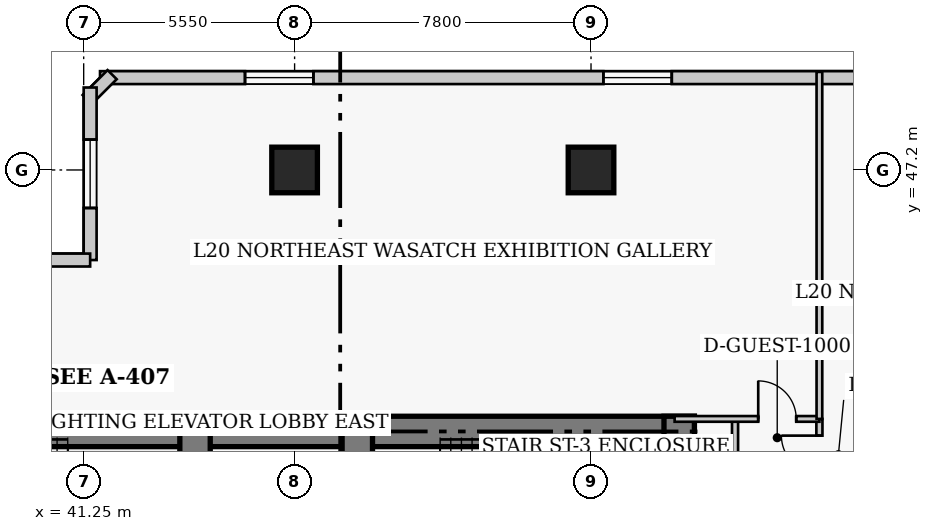
"""IFC4 building model, lengths in metres.
Left out: names, types, materials, properties, quantities, classifications, styles, units other than length and angle.
Written with IfcOpenShell. Run it as: python <this file> out.ifc"""

import sys

from ifc_helpers import new_model, si_unit, direction, frame, frame_2d, origin, origin_2d, place, context, subcontext, project, spatial, rectangle, extrude, element, fill, save


model = new_model("IFC4")
c1 = context("Model", 3, precision=1e-05, world=origin(), true_north=direction((0.0, 1.0)))
c2 = subcontext(c1, "Body", "Model", "MODEL_VIEW")
j1 = project(units=[si_unit("LENGTHUNIT", "METRE"), si_unit("PLANEANGLEUNIT", "RADIAN")], contexts=[c1])
p1 = place(None, origin())
s1 = spatial("IfcSite", under=j1, at=p1, CompositionType="ELEMENT")
p2 = place(p1, origin())
s2 = spatial("IfcBuilding", under=s1, at=p2, CompositionType="ELEMENT")
p3 = place(p2, frame((0.0, 0.0, 84.2)))
s3 = spatial("IfcBuildingStorey", under=s2, at=p3, CompositionType="ELEMENT", Elevation=84.2)
p4 = place(p3, frame((35.85, 40.32, 0.0), z_axis=(0.0, 0.0, 1.0), x_axis=(1.0, 0.0, 0.0)))
e1 = element("IfcWall", 1, at=p4, inside=s3, PredefinedType="SHEAR", context=c2, shape_type="SweptSolid", body=[
    extrude(rectangle(XDim=12.6, YDim=0.8, at=frame_2d((6.3, 0.0))), origin(), (0.0, 0.0, 1.0), 3.8),
])
p5 = place(p3, frame((48.45, 40.32, 0.0), z_axis=(0.0, 0.0, 1.0), x_axis=(1.0, 0.0, 0.0)))
e2 = element("IfcWall", 2, at=p5, inside=s3, PredefinedType="SHEAR", context=c2, shape_type="SweptSolid", body=[
    extrude(rectangle(XDim=8.87, YDim=0.8, at=frame_2d((4.435, 0.0))), origin(), (0.0, 0.0, 1.0), 3.8),
])
p6 = place(p3, frame((56.92, 27.05, 0.0), z_axis=(0.0, 0.0, 1.0), x_axis=(0.0, 1.0, 0.0)))
e3 = element("IfcWall", 3, at=p6, inside=s3, PredefinedType="SHEAR", context=c2, shape_type="SweptSolid", body=[
    extrude(rectangle(XDim=13.67, YDim=0.8, at=frame_2d((6.835, 0.0))), origin(), (0.0, 0.0, 1.0), 3.8),
])
p7 = place(p3, frame((44.18, 36.37, 0.0), z_axis=(0.0, 0.0, 1.0), x_axis=(0.0, 1.0, 0.0)))
e4 = element("IfcWall", 4, at=p7, inside=s3, PredefinedType="SHEAR", context=c2, shape_type="SweptSolid", body=[
    extrude(rectangle(XDim=3.95, YDim=0.8, at=frame_2d((1.975, 0.0))), origin(), (0.0, 0.0, 1.0), 3.8),
])
p8 = place(p3, frame((48.45, 32.35, 0.0), z_axis=(0.0, 0.0, 1.0), x_axis=(0.0, 1.0, 0.0)))
e5 = element("IfcWall", 5, at=p8, inside=s3, PredefinedType="SHEAR", context=c2, shape_type="SweptSolid", body=[
    extrude(rectangle(XDim=7.97, YDim=0.8, at=frame_2d((3.985, 0.0))), origin(), (0.0, 0.0, 1.0), 3.8),
])
p9 = place(p8, frame((5.85, 0.0, 0.0)))
e6 = element("IfcOpeningElement", 6, at=p9, cuts=e5, PredefinedType="OPENING", context=c2, shape_type="SweptSolid", body=[
    extrude(rectangle(XDim=1.1, YDim=2.15, at=frame_2d((0.55, 1.075))), frame((0.0, 0.41, 0.0), z_axis=(0.0, -1.0, 0.0), x_axis=(1.0, 0.0, 0.0)), (0.0, 0.0, 1.0), 0.82),
])
for number, where, z_axis, x_axis in (
    (7, (46.8, 47.2, 0.0), (0.0, 0.0, 1.0), (1.0, 0.0, 0.0)),
    (8, (54.6, 47.2, 0.0), (0.0, 0.0, 1.0), (1.0, 0.0, 0.0)),
):
    element("IfcColumn", number, at=place(p3, frame(where, z_axis=z_axis, x_axis=x_axis)), inside=s3, PredefinedType="COLUMN", context=c2, shape_type="SweptSolid", body=[
        extrude(rectangle(XDim=1.2, YDim=1.2, at=origin_2d()), origin(), (0.0, 0.0, 1.0), 3.8),
    ])
p10 = place(p3, frame((69.97, 49.63, 0.0), z_axis=(0.0, 0.0, 1.0), x_axis=(-1.0, 0.0, 0.0)))
e9 = element("IfcWall", 9, at=p10, inside=s3, PredefinedType="SOLIDWALL", context=c2, shape_type="SweptSolid", body=[
    extrude(rectangle(XDim=28.29, YDim=0.34, at=frame_2d((14.145, 0.0))), origin(), (0.0, 0.0, 1.0), 3.54),
])
p11 = place(p10, frame((3.815, 0.0, 0.85)))
e10 = element("IfcOpeningElement", 10, at=p11, cuts=e9, PredefinedType="OPENING", context=c2, shape_type="SweptSolid", body=[
    extrude(rectangle(XDim=1.8, YDim=1.8, at=frame_2d((0.9, 0.9))), frame((0.0, 0.18, 0.0), z_axis=(0.0, -1.0, 0.0), x_axis=(1.0, 0.0, 0.0)), (0.0, 0.0, 1.0), 0.36),
])
p12 = place(p10, frame((13.245, 0.0, 0.85)))
e11 = element("IfcOpeningElement", 11, at=p12, cuts=e9, PredefinedType="OPENING", context=c2, shape_type="SweptSolid", body=[
    extrude(rectangle(XDim=1.8, YDim=1.8, at=frame_2d((0.9, 0.9))), frame((0.0, 0.18, 0.0), z_axis=(0.0, -1.0, 0.0), x_axis=(1.0, 0.0, 0.0)), (0.0, 0.0, 1.0), 0.36),
])
p13 = place(p10, frame((22.675, 0.0, 0.85)))
e12 = element("IfcOpeningElement", 12, at=p13, cuts=e9, PredefinedType="OPENING", context=c2, shape_type="SweptSolid", body=[
    extrude(rectangle(XDim=1.8, YDim=1.8, at=frame_2d((0.9, 0.9))), frame((0.0, 0.18, 0.0), z_axis=(0.0, -1.0, 0.0), x_axis=(1.0, 0.0, 0.0)), (0.0, 0.0, 1.0), 0.36),
])
p14 = place(p3, frame((41.999, 49.708, 0.0), z_axis=(0.0, 0.0, 1.0), x_axis=(-0.707238225886, -0.706975312048, 0.0)))
e13 = element("IfcWall", 13, at=p14, inside=s3, PredefinedType="SOLIDWALL", context=c2, shape_type="SweptSolid", body=[
    extrude(rectangle(XDim=0.929, YDim=0.34, at=frame_2d((0.464, 0.0))), origin(), (0.0, 0.0, 1.0), 3.54),
])
p15 = place(p3, frame((41.42, 49.37, 0.0), z_axis=(0.0, 0.0, 1.0), x_axis=(0.0, -1.0, 0.0)))
e14 = element("IfcWall", 14, at=p15, inside=s3, PredefinedType="SOLIDWALL", context=c2, shape_type="SweptSolid", body=[
    extrude(rectangle(XDim=4.54, YDim=0.34, at=frame_2d((2.27, 0.0))), origin(), (0.0, 0.0, 1.0), 3.54),
])
p16 = place(p15, frame((1.37, 0.0, 0.85)))
e15 = element("IfcOpeningElement", 15, at=p16, cuts=e14, PredefinedType="OPENING", context=c2, shape_type="SweptSolid", body=[
    extrude(rectangle(XDim=1.8, YDim=1.8, at=frame_2d((0.9, 0.9))), frame((0.0, 0.18, 0.0), z_axis=(0.0, -1.0, 0.0), x_axis=(1.0, 0.0, 0.0)), (0.0, 0.0, 1.0), 0.36),
])
p17 = place(p3, frame((41.42, 44.83, 0.0), z_axis=(0.0, 0.0, 1.0), x_axis=(-1.0, 0.0, 0.0)))
e16 = element("IfcWall", 16, at=p17, inside=s3, PredefinedType="SOLIDWALL", context=c2, shape_type="SweptSolid", body=[
    extrude(rectangle(XDim=4.84, YDim=0.34, at=frame_2d((2.42, 0.0))), origin(), (0.0, 0.0, 1.0), 3.54),
])
p18 = place(p17, frame((1.52, 0.0, 0.85)))
e17 = element("IfcOpeningElement", 17, at=p18, cuts=e16, PredefinedType="OPENING", context=c2, shape_type="SweptSolid", body=[
    extrude(rectangle(XDim=1.8, YDim=1.8, at=frame_2d((0.9, 0.9))), frame((0.0, 0.18, 0.0), z_axis=(0.0, -1.0, 0.0), x_axis=(1.0, 0.0, 0.0)), (0.0, 0.0, 1.0), 0.36),
])
p19 = place(p3, frame((60.61, 11.85, 0.0), z_axis=(0.0, 0.0, 1.0), x_axis=(0.0, 1.0, 0.0)))
e18 = element("IfcWall", 18, at=p19, inside=s3, PredefinedType="PARTITIONING", context=c2, shape_type="SweptSolid", body=[
    extrude(rectangle(XDim=28.8, YDim=0.16, at=frame_2d((14.4, 0.0))), origin(), (0.0, 0.0, 1.0), 3.54),
])
p20 = place(p19, frame((3.6, 0.0, 0.0)))
e19 = element("IfcOpeningElement", 19, at=p20, cuts=e18, PredefinedType="OPENING", context=c2, shape_type="SweptSolid", body=[
    extrude(rectangle(XDim=0.95, YDim=2.1, at=frame_2d((0.475, 1.05))), frame((0.0, 0.09, 0.0), z_axis=(0.0, -1.0, 0.0), x_axis=(1.0, 0.0, 0.0)), (0.0, 0.0, 1.0), 0.18),
])
p21 = place(p19, frame((12.075, 0.0, 0.0)))
e20 = element("IfcOpeningElement", 20, at=p21, cuts=e18, PredefinedType="OPENING", context=c2, shape_type="SweptSolid", body=[
    extrude(rectangle(XDim=0.95, YDim=2.1, at=frame_2d((0.475, 1.05))), frame((0.0, 0.09, 0.0), z_axis=(0.0, -1.0, 0.0), x_axis=(1.0, 0.0, 0.0)), (0.0, 0.0, 1.0), 0.18),
])
p22 = place(p19, frame((20.525, 0.0, 0.0)))
e21 = element("IfcOpeningElement", 21, at=p22, cuts=e18, PredefinedType="OPENING", context=c2, shape_type="SweptSolid", body=[
    extrude(rectangle(XDim=0.95, YDim=2.1, at=frame_2d((0.475, 1.05))), frame((0.0, 0.09, 0.0), z_axis=(0.0, -1.0, 0.0), x_axis=(1.0, 0.0, 0.0)), (0.0, 0.0, 1.0), 0.18),
])
p23 = place(p19, frame((27.36, 0.0, 0.0)))
e22 = element("IfcOpeningElement", 22, at=p23, cuts=e18, PredefinedType="OPENING", context=c2, shape_type="SweptSolid", body=[
    extrude(rectangle(XDim=1.0, YDim=2.15, at=frame_2d((0.5, 1.075))), frame((0.0, 0.09, 0.0), z_axis=(0.0, -1.0, 0.0), x_axis=(1.0, 0.0, 0.0)), (0.0, 0.0, 1.0), 0.18),
])
p24 = place(p3, frame((58.39, 24.91, 0.0), z_axis=(0.0, 0.0, 1.0), x_axis=(0.0, 1.0, 0.0)))
e23 = element("IfcWall", 23, at=p24, inside=s3, PredefinedType="PARTITIONING", context=c2, shape_type="SweptSolid", body=[
    extrude(rectangle(XDim=15.74, YDim=0.16, at=frame_2d((7.87, 0.0))), origin(), (0.0, 0.0, 1.0), 3.54),
])
p25 = place(p3, frame((56.8, 40.65, 0.0), z_axis=(0.0, 0.0, 1.0), x_axis=(1.0, 0.0, 0.0)))
e24 = element("IfcWall", 24, at=p25, inside=s3, PredefinedType="PARTITIONING", context=c2, shape_type="SweptSolid", body=[
    extrude(rectangle(XDim=3.81, YDim=0.15, at=frame_2d((1.905, 0.0))), origin(), (0.0, 0.0, 1.0), 3.54),
])
p26 = place(p25, frame((2.2, 0.0, 0.0)))
e25 = element("IfcOpeningElement", 25, at=p26, cuts=e24, PredefinedType="OPENING", context=c2, shape_type="SweptSolid", body=[
    extrude(rectangle(XDim=1.0, YDim=2.15, at=frame_2d((0.5, 1.075))), frame((0.0, 0.085, 0.0), z_axis=(0.0, -1.0, 0.0), x_axis=(1.0, 0.0, 0.0)), (0.0, 0.0, 1.0), 0.17),
])
p27 = place(p3, frame((60.61, 40.65, 0.0), z_axis=(0.0, 0.0, 1.0), x_axis=(0.0, 1.0, 0.0)))
e26 = element("IfcWall", 26, at=p27, inside=s3, PredefinedType="PARTITIONING", context=c2, shape_type="SweptSolid", body=[
    extrude(rectangle(XDim=9.13, YDim=0.15, at=frame_2d((4.565, 0.0))), origin(), (0.0, 0.0, 1.0), 3.54),
])
p28 = place(p12, origin())
e27 = element("IfcWindow", 27, at=p28, inside=s3, PartitioningType="SINGLE_PANEL", PredefinedType="WINDOW", context=c2, shape_type="SweptSolid", body=[
    extrude(rectangle(XDim=1.8, YDim=1.8, at=frame_2d((0.9, 0.9))), frame((0.0, 0.03, 0.0), z_axis=(0.0, -1.0, 0.0), x_axis=(1.0, 0.0, 0.0)), (0.0, 0.0, 1.0), 0.06),
])
fill(e11, e27)
p29 = place(p13, origin())
e28 = element("IfcWindow", 28, at=p29, inside=s3, PartitioningType="SINGLE_PANEL", PredefinedType="WINDOW", context=c2, shape_type="SweptSolid", body=[
    extrude(rectangle(XDim=1.8, YDim=1.8, at=frame_2d((0.9, 0.9))), frame((0.0, 0.03, 0.0), z_axis=(0.0, -1.0, 0.0), x_axis=(1.0, 0.0, 0.0)), (0.0, 0.0, 1.0), 0.06),
])
fill(e12, e28)
p30 = place(p16, origin())
e29 = element("IfcWindow", 29, at=p30, inside=s3, PartitioningType="SINGLE_PANEL", PredefinedType="WINDOW", context=c2, shape_type="SweptSolid", body=[
    extrude(rectangle(XDim=1.8, YDim=1.8, at=frame_2d((0.9, 0.9))), frame((0.0, 0.03, 0.0), z_axis=(0.0, -1.0, 0.0), x_axis=(1.0, 0.0, 0.0)), (0.0, 0.0, 1.0), 0.06),
])
fill(e15, e29)
p31 = place(p26, origin())
e30 = element("IfcDoor", 30, at=p31, inside=s3, OperationType="SINGLE_SWING_LEFT", PredefinedType="DOOR", context=c2, shape_type="SweptSolid", body=[
    extrude(rectangle(XDim=1.0, YDim=2.15, at=frame_2d((0.5, 1.075))), frame((0.0, 0.025, 0.0), z_axis=(0.0, -1.0, 0.0), x_axis=(1.0, 0.0, 0.0)), (0.0, 0.0, 1.0), 0.05),
])
fill(e25, e30)
p32 = place(p23, origin())
e31 = element("IfcDoor", 31, at=p32, inside=s3, OperationType="SINGLE_SWING_RIGHT", PredefinedType="DOOR", context=c2, shape_type="SweptSolid", body=[
    extrude(rectangle(XDim=1.0, YDim=2.15, at=frame_2d((0.5, 1.075))), frame((0.0, 0.025, 0.0), z_axis=(0.0, -1.0, 0.0), x_axis=(1.0, 0.0, 0.0)), (0.0, 0.0, 1.0), 0.05),
])
fill(e22, e31)
save(model, sys.argv[1])
